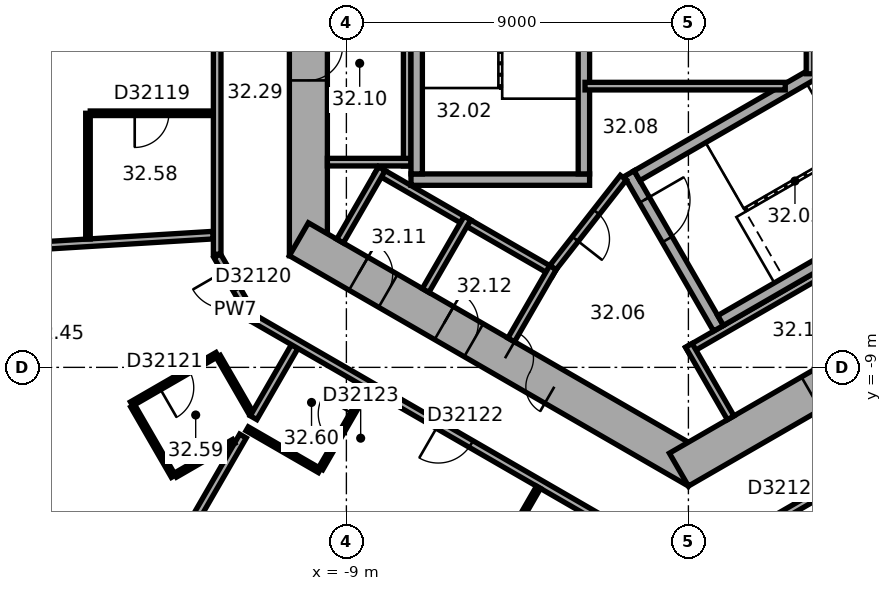
"""IFC4 building model, lengths in metres.
Left out: names, types, materials, properties, quantities, classifications, styles, units other than length and angle.
Written with IfcOpenShell. Run it as: python <this file> out.ifc"""

import sys

from ifc_helpers import new_model, si_unit, direction, frame, frame_2d, origin, place, context, subcontext, project, spatial, rectangle, extrude, element, fill, save


model = new_model("IFC4")
c1 = context("Model", 3, precision=1e-05, world=origin(), true_north=direction((0.0, 1.0)))
c2 = subcontext(c1, "Body", "Model", "MODEL_VIEW")
j1 = project(units=[si_unit("LENGTHUNIT", "METRE"), si_unit("PLANEANGLEUNIT", "RADIAN")], contexts=[c1])
p1 = place(None, origin())
s1 = spatial("IfcSite", under=j1, at=p1, CompositionType="ELEMENT")
p2 = place(p1, origin())
s2 = spatial("IfcBuilding", under=s1, at=p2, CompositionType="ELEMENT")
p3 = place(p2, frame((0.0, 0.0, 131.8)))
s3 = spatial("IfcBuildingStorey", under=s2, at=p3, CompositionType="ELEMENT", Elevation=131.8)
p4 = place(p3, frame((-10.0, 6.062, 0.0), z_axis=(0.0, 0.0, 1.0), x_axis=(0.0, -1.0, 0.0)))
e1 = element("IfcWall", 1, at=p4, inside=s3, PredefinedType="SHEAR", context=c2, shape_type="SweptSolid", body=[
    extrude(rectangle(XDim=12.125, YDim=1.0, at=frame_2d((6.062, 0.0))), origin(), (0.0, 0.0, 1.0), 3.7),
])
p5 = place(p4, frame((6.612, 0.0, 0.0)))
e2 = element("IfcOpeningElement", 2, at=p5, cuts=e1, PredefinedType="OPENING", context=c2, shape_type="SweptSolid", body=[
    extrude(rectangle(XDim=0.9, YDim=2.1, at=frame_2d((0.45, 1.05))), frame((0.0, 0.51, 0.0), z_axis=(0.0, -1.0, 0.0), x_axis=(1.0, 0.0, 0.0)), (0.0, 0.0, 1.0), 1.02),
])
p6 = place(p3, frame((-10.25, -5.629, 0.0), z_axis=(0.0, 0.0, 1.0), x_axis=(0.866022616891, -0.50000482701, 0.0)))
e3 = element("IfcWall", 3, at=p6, inside=s3, PredefinedType="SHEAR", context=c2, shape_type="SweptSolid", body=[
    extrude(rectangle(XDim=12.125, YDim=1.0, at=frame_2d((6.062, 0.0))), origin(), (0.0, 0.0, 1.0), 3.7),
])
p7 = place(p6, frame((6.262, 0.0, 0.0)))
e4 = element("IfcOpeningElement", 4, at=p7, cuts=e3, PredefinedType="OPENING", context=c2, shape_type="SweptSolid", body=[
    extrude(rectangle(XDim=1.5, YDim=2.1, at=frame_2d((0.75, 1.05))), frame((0.0, 0.51, 0.0), z_axis=(0.0, -1.0, 0.0), x_axis=(1.0, 0.0, 0.0)), (0.0, 0.0, 1.0), 1.02),
])
p8 = place(p6, frame((1.812, 0.0, 0.0)))
e5 = element("IfcOpeningElement", 5, at=p8, cuts=e3, PredefinedType="OPENING", context=c2, shape_type="SweptSolid", body=[
    extrude(rectangle(XDim=0.9, YDim=2.1, at=frame_2d((0.45, 1.05))), frame((0.0, 0.51, 0.0), z_axis=(0.0, -1.0, 0.0), x_axis=(1.0, 0.0, 0.0)), (0.0, 0.0, 1.0), 1.02),
])
p9 = place(p6, frame((4.412, 0.0, 0.0)))
e6 = element("IfcOpeningElement", 6, at=p9, cuts=e3, PredefinedType="OPENING", context=c2, shape_type="SweptSolid", body=[
    extrude(rectangle(XDim=0.9, YDim=2.1, at=frame_2d((0.45, 1.05))), frame((0.0, 0.51, 0.0), z_axis=(0.0, -1.0, 0.0), x_axis=(1.0, 0.0, 0.0)), (0.0, 0.0, 1.0), 1.02),
])
p10 = place(p3, frame((-0.25, -11.691, 0.0), z_axis=(0.0, 0.0, 1.0), x_axis=(0.866022616891, 0.50000482701, 0.0)))
e7 = element("IfcWall", 7, at=p10, inside=s3, PredefinedType="SHEAR", context=c2, shape_type="SweptSolid", body=[
    extrude(rectangle(XDim=12.125, YDim=1.0, at=frame_2d((6.062, 0.0))), origin(), (0.0, 0.0, 1.0), 3.7),
])
p11 = place(p10, frame((4.012, 0.0, 0.0)))
e8 = element("IfcOpeningElement", 8, at=p11, cuts=e7, PredefinedType="OPENING", context=c2, shape_type="SweptSolid", body=[
    extrude(rectangle(XDim=0.9, YDim=2.1, at=frame_2d((0.45, 1.05))), frame((0.0, 0.51, 0.0), z_axis=(0.0, -1.0, 0.0), x_axis=(1.0, 0.0, 0.0)), (0.0, 0.0, 1.0), 1.02),
])
p12 = place(p10, frame((7.812, 0.0, 0.0)))
e9 = element("IfcOpeningElement", 9, at=p12, cuts=e7, PredefinedType="OPENING", context=c2, shape_type="SweptSolid", body=[
    extrude(rectangle(XDim=1.1, YDim=2.1, at=frame_2d((0.55, 1.05))), frame((0.0, 0.51, 0.0), z_axis=(0.0, -1.0, 0.0), x_axis=(1.0, 0.0, 0.0)), (0.0, 0.0, 1.0), 1.02),
])
p13 = place(p3, frame((-7.4, 4.3, 0.0), z_axis=(0.0, 0.0, 1.0), x_axis=(0.0, -1.0, 0.0)))
e10 = element("IfcWall", 10, at=p13, inside=s3, PredefinedType="PARTITIONING", context=c2, shape_type="SweptSolid", body=[
    extrude(rectangle(XDim=8.0, YDim=0.2, at=frame_2d((4.0, 0.0))), origin(), (0.0, 0.0, 1.0), 3.42),
])
p14 = place(p3, frame((-7.3, -3.6, 0.0), z_axis=(0.0, 0.0, 1.0), x_axis=(-1.0, 0.0, 0.0)))
e11 = element("IfcWall", 11, at=p14, inside=s3, PredefinedType="PARTITIONING", context=c2, shape_type="SweptSolid", body=[
    extrude(rectangle(XDim=2.2, YDim=0.2, at=frame_2d((1.1, 0.0))), origin(), (0.0, 0.0, 1.0), 3.42),
])
p15 = place(p3, frame((-8.203, -3.809, 0.0), z_axis=(0.0, 0.0, 1.0), x_axis=(0.866028230842, -0.499995103361, 0.0)))
e12 = element("IfcWall", 12, at=p15, inside=s3, PredefinedType="PARTITIONING", context=c2, shape_type="SweptSolid", body=[
    extrude(rectangle(XDim=5.4, YDim=0.2, at=frame_2d((2.7, 0.0))), origin(), (0.0, 0.0, 1.0), 3.42),
])
for number, where, z_axis, x_axis in (
    (13, (-8.067, -3.772, 0.0), (0.0, 0.0, 1.0), (-0.5, -0.866, 0.0)),
    (14, (-5.815, -5.072, 0.0), (0.0, 0.0, 1.0), (-0.5, -0.866, 0.0)),
):
    element("IfcWall", number, at=place(p3, frame(where, z_axis=z_axis, x_axis=x_axis)), inside=s3, PredefinedType="PARTITIONING", context=c2, shape_type="SweptSolid", body=[
        extrude(rectangle(XDim=2.2, YDim=0.2, at=frame_2d((1.1, 0.0))), origin(), (0.0, 0.0, 1.0), 3.42),
    ])
p16 = place(p3, frame((-3.563, -6.372, 0.0), z_axis=(0.0, 0.0, 1.0), x_axis=(-0.499994660107, -0.866028486751, 0.0)))
e15 = element("IfcWall", 15, at=p16, inside=s3, PredefinedType="PARTITIONING", context=c2, shape_type="SweptSolid", body=[
    extrude(rectangle(XDim=2.2, YDim=0.2, at=frame_2d((1.1, 0.0))), origin(), (0.0, 0.0, 1.0), 3.42),
])
p17 = place(p3, frame((-0.024, -8.559, 0.0), z_axis=(0.0, 0.0, 1.0), x_axis=(0.866026010844, 0.49999894854, 0.0)))
e16 = element("IfcWall", 16, at=p17, inside=s3, PredefinedType="PARTITIONING", context=c2, shape_type="SweptSolid", body=[
    extrude(rectangle(XDim=8.0, YDim=0.2, at=frame_2d((4.0, 0.0))), origin(), (0.0, 0.0, 1.0), 3.42),
])
p18 = place(p3, frame((0.013, -8.422, 0.0), z_axis=(0.0, 0.0, 1.0), x_axis=(0.500077893725, -0.86598042715, 0.0)))
e17 = element("IfcWall", 17, at=p18, inside=s3, PredefinedType="PARTITIONING", context=c2, shape_type="SweptSolid", body=[
    extrude(rectangle(XDim=2.2, YDim=0.2, at=frame_2d((1.1, 0.0))), origin(), (0.0, 0.0, 1.0), 3.42),
])
p19 = place(p3, frame((-2.6, -4.06, 0.0), z_axis=(0.0, 0.0, 1.0), x_axis=(-1.0, 0.0, 0.0)))
e18 = element("IfcWall", 18, at=p19, inside=s3, PredefinedType="SHEAR", context=c2, shape_type="SweptSolid", body=[
    extrude(rectangle(XDim=4.7, YDim=0.3, at=frame_2d((2.35, 0.0))), origin(), (0.0, 0.0, 1.0), 3.42),
])
for number, where, z_axis, x_axis in (
    (19, (-2.75, 3.15, 0.0), (0.0, 0.0, 1.0), (0.0, -1.0, 0.0)),
    (20, (-7.15, 3.15, 0.0), (0.0, 0.0, 1.0), (0.0, -1.0, 0.0)),
):
    element("IfcWall", number, at=place(p3, frame(where, z_axis=z_axis, x_axis=x_axis)), inside=s3, PredefinedType="SHEAR", context=c2, shape_type="SweptSolid", body=[
        extrude(rectangle(XDim=7.06, YDim=0.3, at=frame_2d((3.53, 0.0))), origin(), (0.0, 0.0, 1.0), 3.42),
    ])
p20 = place(p3, frame((-1.558, -3.902, 0.0), z_axis=(0.0, 0.0, 1.0), x_axis=(0.499977259774, -0.866038532462, 0.0)))
e21 = element("IfcWall", 21, at=p20, inside=s3, PredefinedType="SHEAR", context=c2, shape_type="SweptSolid", body=[
    extrude(rectangle(XDim=4.7, YDim=0.3, at=frame_2d((2.35, 0.0))), origin(), (0.0, 0.0, 1.0), 3.42),
])
p21 = place(p20, frame((0.8, 0.0, 0.0)))
e22 = element("IfcOpeningElement", 22, at=p21, cuts=e21, PredefinedType="OPENING", context=c2, shape_type="SweptSolid", body=[
    extrude(rectangle(XDim=1.2, YDim=2.1, at=frame_2d((0.6, 1.05))), frame((0.0, 0.16, 0.0), z_axis=(0.0, -1.0, 0.0), x_axis=(1.0, 0.0, 0.0)), (0.0, 0.0, 1.0), 0.32),
])
for number, where, z_axis, x_axis in (
    (23, (-1.353, -3.957, 0.0), (0.0, 0.0, 1.0), (0.866, 0.5, 0.0)),
    (24, (0.847, -7.767, 0.0), (0.0, 0.0, 1.0), (0.866, 0.5, 0.0)),
):
    element("IfcWall", number, at=place(p3, frame(where, z_axis=z_axis, x_axis=x_axis)), inside=s3, PredefinedType="SHEAR", context=c2, shape_type="SweptSolid", body=[
        extrude(rectangle(XDim=7.06, YDim=0.3, at=frame_2d((3.53, 0.0))), origin(), (0.0, 0.0, 1.0), 3.42),
    ])
p22 = place(p3, frame((-1.712, -4.008, 0.0), z_axis=(0.0, 0.0, 1.0), x_axis=(-0.616549420702, -0.787316208287, 0.0)))
e25 = element("IfcWall", 25, at=p22, inside=s3, PredefinedType="PARTITIONING", context=c2, shape_type="SweptSolid", body=[
    extrude(rectangle(XDim=3.002, YDim=0.2, at=frame_2d((1.501, 0.0))), origin(), (0.0, 0.0, 1.0), 3.42),
])
p23 = place(p22, frame((1.15, 0.0, 0.0)))
e26 = element("IfcOpeningElement", 26, at=p23, cuts=e25, PredefinedType="OPENING", context=c2, shape_type="SweptSolid", body=[
    extrude(rectangle(XDim=0.9, YDim=2.1, at=frame_2d((0.45, 1.05))), frame((0.0, 0.11, 0.0), z_axis=(0.0, -1.0, 0.0), x_axis=(1.0, 0.0, 0.0)), (0.0, 0.0, 1.0), 0.22),
])
p24 = place(p3, frame((-2.72, -1.6, 0.0), z_axis=(0.0, 0.0, 1.0), x_axis=(1.0, 0.0, 0.0)))
e27 = element("IfcWall", 27, at=p24, inside=s3, PredefinedType="PARTITIONING", context=c2, shape_type="SweptSolid", body=[
    extrude(rectangle(XDim=5.269, YDim=0.2, at=frame_2d((2.634, 0.0))), origin(), (0.0, 0.0, 1.0), 3.42),
])
p25 = place(p3, frame((3.2, -1.275, 0.0), z_axis=(0.0, 0.0, 1.0), x_axis=(0.0, 1.0, 0.0)))
e28 = element("IfcWall", 28, at=p25, inside=s3, PredefinedType="PARTITIONING", context=c2, shape_type="SweptSolid", body=[
    extrude(rectangle(XDim=2.549, YDim=0.2, at=frame_2d((1.275, 0.0))), origin(), (0.0, 0.0, 1.0), 3.42),
])
p26 = place(p3, frame((-20.421, -6.005, 0.0), z_axis=(0.0, 0.0, 1.0), x_axis=(0.998134865741, 0.061047438866, 0.0)))
e29 = element("IfcWall", 29, at=p26, inside=s3, PredefinedType="PARTITIONING", context=c2, shape_type="SweptSolid", body=[
    extrude(rectangle(XDim=7.927, YDim=0.2, at=frame_2d((3.963, 0.0))), origin(), (0.0, 0.0, 1.0), 2.87),
])
p27 = place(p3, frame((-15.8, -5.622, 0.0), z_axis=(0.0, 0.0, 1.0), x_axis=(0.0, 1.0, 0.0)))
e30 = element("IfcWall", 30, at=p27, inside=s3, PredefinedType="PARTITIONING", context=c2, shape_type="SweptSolid", body=[
    extrude(rectangle(XDim=3.308, YDim=0.12, at=frame_2d((1.654, 0.0))), origin(), (0.0, 0.0, 1.0), 3.42),
])
p28 = place(p3, frame((-15.74, -2.314, 0.0), z_axis=(0.0, 0.0, 1.0), x_axis=(1.0, 0.0, 0.0)))
e31 = element("IfcWall", 31, at=p28, inside=s3, PredefinedType="PARTITIONING", context=c2, shape_type="SweptSolid", body=[
    extrude(rectangle(XDim=3.24, YDim=0.12, at=frame_2d((1.62, 0.0))), origin(), (0.0, 0.0, 1.0), 3.42),
])
p29 = place(p28, frame((1.17, 0.0, 0.0)))
e32 = element("IfcOpeningElement", 32, at=p29, cuts=e31, PredefinedType="OPENING", context=c2, shape_type="SweptSolid", body=[
    extrude(rectangle(XDim=0.9, YDim=2.1, at=frame_2d((0.45, 1.05))), frame((0.0, 0.07, 0.0), z_axis=(0.0, -1.0, 0.0), x_axis=(1.0, 0.0, 0.0)), (0.0, 0.0, 1.0), 0.14),
])
p30 = place(p3, frame((-14.653, -9.961, 0.0), z_axis=(0.0, 0.0, 1.0), x_axis=(0.866021400173, 0.500006934395, 0.0)))
e33 = element("IfcWall", 33, at=p30, inside=s3, PredefinedType="PARTITIONING", context=c2, shape_type="SweptSolid", body=[
    extrude(rectangle(XDim=2.6, YDim=0.12, at=frame_2d((1.3, 0.0))), origin(), (0.0, 0.0, 1.0), 3.42),
])
p31 = place(p30, frame((0.85, 0.0, 0.0)))
e34 = element("IfcOpeningElement", 34, at=p31, cuts=e33, PredefinedType="OPENING", context=c2, shape_type="SweptSolid", body=[
    extrude(rectangle(XDim=0.9, YDim=2.1, at=frame_2d((0.45, 1.05))), frame((0.0, 0.07, 0.0), z_axis=(0.0, -1.0, 0.0), x_axis=(1.0, 0.0, 0.0)), (0.0, 0.0, 1.0), 0.14),
])
p32 = place(p3, frame((-14.486, -15.597, 0.0), z_axis=(0.0, 0.0, 1.0), x_axis=(0.500003965547, 0.866023114263, 0.0)))
e35 = element("IfcWall", 35, at=p32, inside=s3, PredefinedType="PARTITIONING", context=c2, shape_type="SweptSolid", body=[
    extrude(rectangle(XDim=5.53, YDim=0.2, at=frame_2d((2.765, 0.0))), origin(), (0.0, 0.0, 1.0), 3.42),
])
p33 = place(p3, frame((-13.552, -11.866, 0.0), z_axis=(0.0, 0.0, 1.0), x_axis=(-0.500028586798, 0.86600889856, 0.0)))
e36 = element("IfcWall", 36, at=p33, inside=s3, PredefinedType="PARTITIONING", context=c2, shape_type="SweptSolid", body=[
    extrude(rectangle(XDim=2.14, YDim=0.12, at=frame_2d((1.07, 0.0))), origin(), (0.0, 0.0, 1.0), 3.42),
])
p34 = place(p3, frame((-12.4, -6.062, 0.0), z_axis=(0.0, 0.0, 1.0), x_axis=(0.500022797313, -0.86601224135, 0.0)))
e37 = element("IfcWall", 37, at=p34, inside=s3, PredefinedType="PARTITIONING", context=c2, shape_type="SweptSolid", body=[
    extrude(rectangle(XDim=1.9, YDim=0.2, at=frame_2d((0.95, 0.0))), origin(), (0.0, 0.0, 1.0), 3.42),
])
p35 = place(p34, frame((0.45, 0.0, 0.0)))
e38 = element("IfcOpeningElement", 38, at=p35, cuts=e37, PredefinedType="OPENING", context=c2, shape_type="SweptSolid", body=[
    extrude(rectangle(XDim=1.0, YDim=2.1, at=frame_2d((0.5, 1.05))), frame((0.0, 0.11, 0.0), z_axis=(0.0, -1.0, 0.0), x_axis=(1.0, 0.0, 0.0)), (0.0, 0.0, 1.0), 0.22),
])
p36 = place(p3, frame((-12.4, 5.769, 0.0), z_axis=(0.0, 0.0, 1.0), x_axis=(0.0, -1.0, 0.0)))
e39 = element("IfcWall", 39, at=p36, inside=s3, PredefinedType="PARTITIONING", context=c2, shape_type="SweptSolid", body=[
    extrude(rectangle(XDim=11.792, YDim=0.2, at=frame_2d((5.896, 0.0))), origin(), (0.0, 0.0, 1.0), 3.42),
])
p37 = place(p36, frame((1.381, 0.0, 0.0)))
e40 = element("IfcOpeningElement", 40, at=p37, cuts=e39, PredefinedType="OPENING", context=c2, shape_type="SweptSolid", body=[
    extrude(rectangle(XDim=1.0, YDim=2.1, at=frame_2d((0.5, 1.05))), frame((0.0, 0.11, 0.0), z_axis=(0.0, -1.0, 0.0), x_axis=(1.0, 0.0, 0.0)), (0.0, 0.0, 1.0), 0.22),
])
p38 = place(p36, frame((5.397, 0.0, 0.0)))
e41 = element("IfcOpeningElement", 41, at=p38, cuts=e39, PredefinedType="OPENING", context=c2, shape_type="SweptSolid", body=[
    extrude(rectangle(XDim=1.0, YDim=2.1, at=frame_2d((0.5, 1.05))), frame((0.0, 0.11, 0.0), z_axis=(0.0, -1.0, 0.0), x_axis=(1.0, 0.0, 0.0)), (0.0, 0.0, 1.0), 0.22),
])
p39 = place(p3, frame((-12.371, -8.713, 0.0), z_axis=(0.0, 0.0, 1.0), x_axis=(0.499910907645, -0.86607683517, 0.0)))
e42 = element("IfcWall", 42, at=p39, inside=s3, PredefinedType="PARTITIONING", context=c2, shape_type="SweptSolid", body=[
    extrude(rectangle(XDim=1.719, YDim=0.12, at=frame_2d((0.86, 0.0))), origin(), (0.0, 0.0, 1.0), 3.42),
])
p40 = place(p3, frame((-11.964, -10.949, 0.0), z_axis=(0.0, 0.0, 1.0), x_axis=(-0.86600680221, -0.500032217487, 0.0)))
e43 = element("IfcWall", 43, at=p40, inside=s3, PredefinedType="PARTITIONING", context=c2, shape_type="SweptSolid", body=[
    extrude(rectangle(XDim=1.774, YDim=0.12, at=frame_2d((0.887, 0.0))), origin(), (0.0, 0.0, 1.0), 3.42),
])
p41 = place(p3, frame((-11.442, -10.325, 0.0), z_axis=(0.0, 0.0, 1.0), x_axis=(0.500012369163, 0.866018262327, 0.0)))
e44 = element("IfcWall", 44, at=p41, inside=s3, PredefinedType="PARTITIONING", context=c2, shape_type="SweptSolid", body=[
    extrude(rectangle(XDim=2.163, YDim=0.2, at=frame_2d((1.081, 0.0))), origin(), (0.0, 0.0, 1.0), 3.42),
])
p42 = place(p3, frame((-11.415, -7.728, 0.0), z_axis=(0.0, 0.0, 1.0), x_axis=(0.866022749921, -0.500004596598, 0.0)))
e45 = element("IfcWall", 45, at=p42, inside=s3, PredefinedType="PARTITIONING", context=c2, shape_type="SweptSolid", body=[
    extrude(rectangle(XDim=12.084, YDim=0.2, at=frame_2d((6.042, 0.0))), origin(), (0.0, 0.0, 1.0), 3.42),
])
p43 = place(p42, frame((5.58, 0.0, 0.0)))
e46 = element("IfcOpeningElement", 46, at=p43, cuts=e45, PredefinedType="OPENING", context=c2, shape_type="SweptSolid", body=[
    extrude(rectangle(XDim=1.0, YDim=2.1, at=frame_2d((0.5, 1.05))), frame((0.0, 0.11, 0.0), z_axis=(0.0, -1.0, 0.0), x_axis=(1.0, 0.0, 0.0)), (0.0, 0.0, 1.0), 0.22),
])
p44 = place(p3, frame((-9.706, -11.717, 0.0), z_axis=(0.0, 0.0, 1.0), x_axis=(-0.86598042715, 0.500077893725, 0.0)))
e47 = element("IfcWall", 47, at=p44, inside=s3, PredefinedType="PARTITIONING", context=c2, shape_type="SweptSolid", body=[
    extrude(rectangle(XDim=2.2, YDim=0.12, at=frame_2d((1.1, 0.0))), origin(), (0.0, 0.0, 1.0), 3.42),
])
p45 = place(p3, frame((-8.456, -9.552, 0.0), z_axis=(0.0, 0.0, 1.0), x_axis=(-0.500002508028, -0.866023955769, 0.0)))
e48 = element("IfcWall", 48, at=p45, inside=s3, PredefinedType="PARTITIONING", context=c2, shape_type="SweptSolid", body=[
    extrude(rectangle(XDim=2.44, YDim=0.12, at=frame_2d((1.22, 0.0))), origin(), (0.0, 0.0, 1.0), 3.42),
])
p46 = place(p45, frame((0.77, 0.0, 0.0)))
e49 = element("IfcOpeningElement", 49, at=p46, cuts=e48, PredefinedType="OPENING", context=c2, shape_type="SweptSolid", body=[
    extrude(rectangle(XDim=0.9, YDim=2.1, at=frame_2d((0.45, 1.05))), frame((0.0, 0.07, 0.0), z_axis=(0.0, -1.0, 0.0), x_axis=(1.0, 0.0, 0.0)), (0.0, 0.0, 1.0), 0.14),
])
p47 = place(p3, frame((-5.695, -15.188, 0.0), z_axis=(0.0, 0.0, 1.0), x_axis=(0.500010275428, 0.866019471182, 0.0)))
e50 = element("IfcWall", 50, at=p47, inside=s3, PredefinedType="PARTITIONING", context=c2, shape_type="SweptSolid", body=[
    extrude(rectangle(XDim=3.5, YDim=0.12, at=frame_2d((1.75, 0.0))), origin(), (0.0, 0.0, 1.0), 3.42),
])
p48 = place(p47, frame((1.3, 0.0, 0.0)))
e51 = element("IfcOpeningElement", 51, at=p48, cuts=e50, PredefinedType="OPENING", context=c2, shape_type="SweptSolid", body=[
    extrude(rectangle(XDim=0.9, YDim=2.1, at=frame_2d((0.45, 1.05))), frame((0.0, 0.07, 0.0), z_axis=(0.0, -1.0, 0.0), x_axis=(1.0, 0.0, 0.0)), (0.0, 0.0, 1.0), 0.14),
])
p49 = place(p3, frame((1.204, -13.623, 0.0), z_axis=(0.0, 0.0, 1.0), x_axis=(0.866031867142, 0.49998880497, 0.0)))
e52 = element("IfcWall", 52, at=p49, inside=s3, PredefinedType="PARTITIONING", context=c2, shape_type="SweptSolid", body=[
    extrude(rectangle(XDim=6.268, YDim=0.2, at=frame_2d((3.134, 0.0))), origin(), (0.0, 0.0, 1.0), 3.42),
])
p50 = place(p49, frame((1.381, 0.0, 0.0)))
e53 = element("IfcOpeningElement", 53, at=p50, cuts=e52, PredefinedType="OPENING", context=c2, shape_type="SweptSolid", body=[
    extrude(rectangle(XDim=1.0, YDim=2.1, at=frame_2d((0.5, 1.05))), frame((0.0, 0.11, 0.0), z_axis=(0.0, -1.0, 0.0), x_axis=(1.0, 0.0, 0.0)), (0.0, 0.0, 1.0), 0.22),
])
p51 = place(p49, frame((4.515, 0.0, 0.0)))
e54 = element("IfcOpeningElement", 54, at=p51, cuts=e52, PredefinedType="OPENING", context=c2, shape_type="SweptSolid", body=[
    extrude(rectangle(XDim=1.0, YDim=2.1, at=frame_2d((0.5, 1.05))), frame((0.0, 0.11, 0.0), z_axis=(0.0, -1.0, 0.0), x_axis=(1.0, 0.0, 0.0)), (0.0, 0.0, 1.0), 0.22),
])
p52 = place(p7, origin())
e55 = element("IfcDoor", 55, at=p52, inside=s3, OperationType="DOUBLE_DOOR_SINGLE_SWING", PredefinedType="DOOR", context=c2, shape_type="SweptSolid", body=[
    extrude(rectangle(XDim=1.5, YDim=2.1, at=frame_2d((0.75, 1.05))), frame((0.0, 0.025, 0.0), z_axis=(0.0, -1.0, 0.0), x_axis=(1.0, 0.0, 0.0)), (0.0, 0.0, 1.0), 0.05),
])
fill(e4, e55)
p53 = place(p21, origin())
e56 = element("IfcDoor", 56, at=p53, inside=s3, OperationType="SINGLE_SWING_RIGHT", PredefinedType="DOOR", context=c2, shape_type="SweptSolid", body=[
    extrude(rectangle(XDim=1.2, YDim=2.1, at=frame_2d((0.6, 1.05))), frame((0.0, 0.025, 0.0), z_axis=(0.0, -1.0, 0.0), x_axis=(1.0, 0.0, 0.0)), (0.0, 0.0, 1.0), 0.05),
])
fill(e22, e56)
p54 = place(p23, origin())
e57 = element("IfcDoor", 57, at=p54, inside=s3, OperationType="SINGLE_SWING_LEFT", PredefinedType="DOOR", context=c2, shape_type="SweptSolid", body=[
    extrude(rectangle(XDim=0.9, YDim=2.1, at=frame_2d((0.45, 1.05))), frame((0.0, 0.025, 0.0), z_axis=(0.0, -1.0, 0.0), x_axis=(1.0, 0.0, 0.0)), (0.0, 0.0, 1.0), 0.05),
])
fill(e26, e57)
p55 = place(p5, origin())
e58 = element("IfcDoor", 58, at=p55, inside=s3, OperationType="SINGLE_SWING_LEFT", PredefinedType="DOOR", context=c2, shape_type="SweptSolid", body=[
    extrude(rectangle(XDim=0.9, YDim=2.1, at=frame_2d((0.45, 1.05))), frame((0.0, 0.025, 0.0), z_axis=(0.0, -1.0, 0.0), x_axis=(1.0, 0.0, 0.0)), (0.0, 0.0, 1.0), 0.05),
])
fill(e2, e58)
p56 = place(p8, origin())
e59 = element("IfcDoor", 59, at=p56, inside=s3, OperationType="SINGLE_SWING_LEFT", PredefinedType="DOOR", context=c2, shape_type="SweptSolid", body=[
    extrude(rectangle(XDim=0.9, YDim=2.1, at=frame_2d((0.45, 1.05))), frame((0.0, 0.025, 0.0), z_axis=(0.0, -1.0, 0.0), x_axis=(1.0, 0.0, 0.0)), (0.0, 0.0, 1.0), 0.05),
])
fill(e5, e59)
p57 = place(p9, origin())
e60 = element("IfcDoor", 60, at=p57, inside=s3, OperationType="SINGLE_SWING_LEFT", PredefinedType="DOOR", context=c2, shape_type="SweptSolid", body=[
    extrude(rectangle(XDim=0.9, YDim=2.1, at=frame_2d((0.45, 1.05))), frame((0.0, 0.025, 0.0), z_axis=(0.0, -1.0, 0.0), x_axis=(1.0, 0.0, 0.0)), (0.0, 0.0, 1.0), 0.05),
])
fill(e6, e60)
p58 = place(p11, origin())
e61 = element("IfcDoor", 61, at=p58, inside=s3, OperationType="SINGLE_SWING_LEFT", PredefinedType="DOOR", context=c2, shape_type="SweptSolid", body=[
    extrude(rectangle(XDim=0.9, YDim=2.1, at=frame_2d((0.45, 1.05))), frame((0.0, 0.025, 0.0), z_axis=(0.0, -1.0, 0.0), x_axis=(1.0, 0.0, 0.0)), (0.0, 0.0, 1.0), 0.05),
])
fill(e8, e61)
p59 = place(p29, origin())
e62 = element("IfcDoor", 62, at=p59, inside=s3, OperationType="SINGLE_SWING_LEFT", PredefinedType="DOOR", context=c2, shape_type="SweptSolid", body=[
    extrude(rectangle(XDim=0.9, YDim=2.1, at=frame_2d((0.45, 1.05))), frame((0.0, 0.025, 0.0), z_axis=(0.0, -1.0, 0.0), x_axis=(1.0, 0.0, 0.0)), (0.0, 0.0, 1.0), 0.05),
])
fill(e32, e62)
p60 = place(p35, origin())
e63 = element("IfcDoor", 63, at=p60, inside=s3, OperationType="SINGLE_SWING_LEFT", PredefinedType="DOOR", context=c2, shape_type="SweptSolid", body=[
    extrude(rectangle(XDim=1.0, YDim=2.1, at=frame_2d((0.5, 1.05))), frame((0.0, 0.025, 0.0), z_axis=(0.0, -1.0, 0.0), x_axis=(1.0, 0.0, 0.0)), (0.0, 0.0, 1.0), 0.05),
])
fill(e38, e63)
p61 = place(p31, origin())
e64 = element("IfcDoor", 64, at=p61, inside=s3, OperationType="SINGLE_SWING_LEFT", PredefinedType="DOOR", context=c2, shape_type="SweptSolid", body=[
    extrude(rectangle(XDim=0.9, YDim=2.1, at=frame_2d((0.45, 1.05))), frame((0.0, 0.025, 0.0), z_axis=(0.0, -1.0, 0.0), x_axis=(1.0, 0.0, 0.0)), (0.0, 0.0, 1.0), 0.05),
])
fill(e34, e64)
p62 = place(p43, origin())
e65 = element("IfcDoor", 65, at=p62, inside=s3, OperationType="SINGLE_SWING_LEFT", PredefinedType="DOOR", context=c2, shape_type="SweptSolid", body=[
    extrude(rectangle(XDim=1.0, YDim=2.1, at=frame_2d((0.5, 1.05))), frame((0.0, 0.025, 0.0), z_axis=(0.0, -1.0, 0.0), x_axis=(1.0, 0.0, 0.0)), (0.0, 0.0, 1.0), 0.05),
])
fill(e46, e65)
p63 = place(p46, origin())
e66 = element("IfcDoor", 66, at=p63, inside=s3, OperationType="SINGLE_SWING_LEFT", PredefinedType="DOOR", context=c2, shape_type="SweptSolid", body=[
    extrude(rectangle(XDim=0.9, YDim=2.1, at=frame_2d((0.45, 1.05))), frame((0.0, 0.025, 0.0), z_axis=(0.0, -1.0, 0.0), x_axis=(1.0, 0.0, 0.0)), (0.0, 0.0, 1.0), 0.05),
])
fill(e49, e66)
p64 = place(p50, origin())
e67 = element("IfcDoor", 67, at=p64, inside=s3, OperationType="SINGLE_SWING_LEFT", PredefinedType="DOOR", context=c2, shape_type="SweptSolid", body=[
    extrude(rectangle(XDim=1.0, YDim=2.1, at=frame_2d((0.5, 1.05))), frame((0.0, 0.025, 0.0), z_axis=(0.0, -1.0, 0.0), x_axis=(1.0, 0.0, 0.0)), (0.0, 0.0, 1.0), 0.05),
])
fill(e53, e67)
save(model, sys.argv[1])
